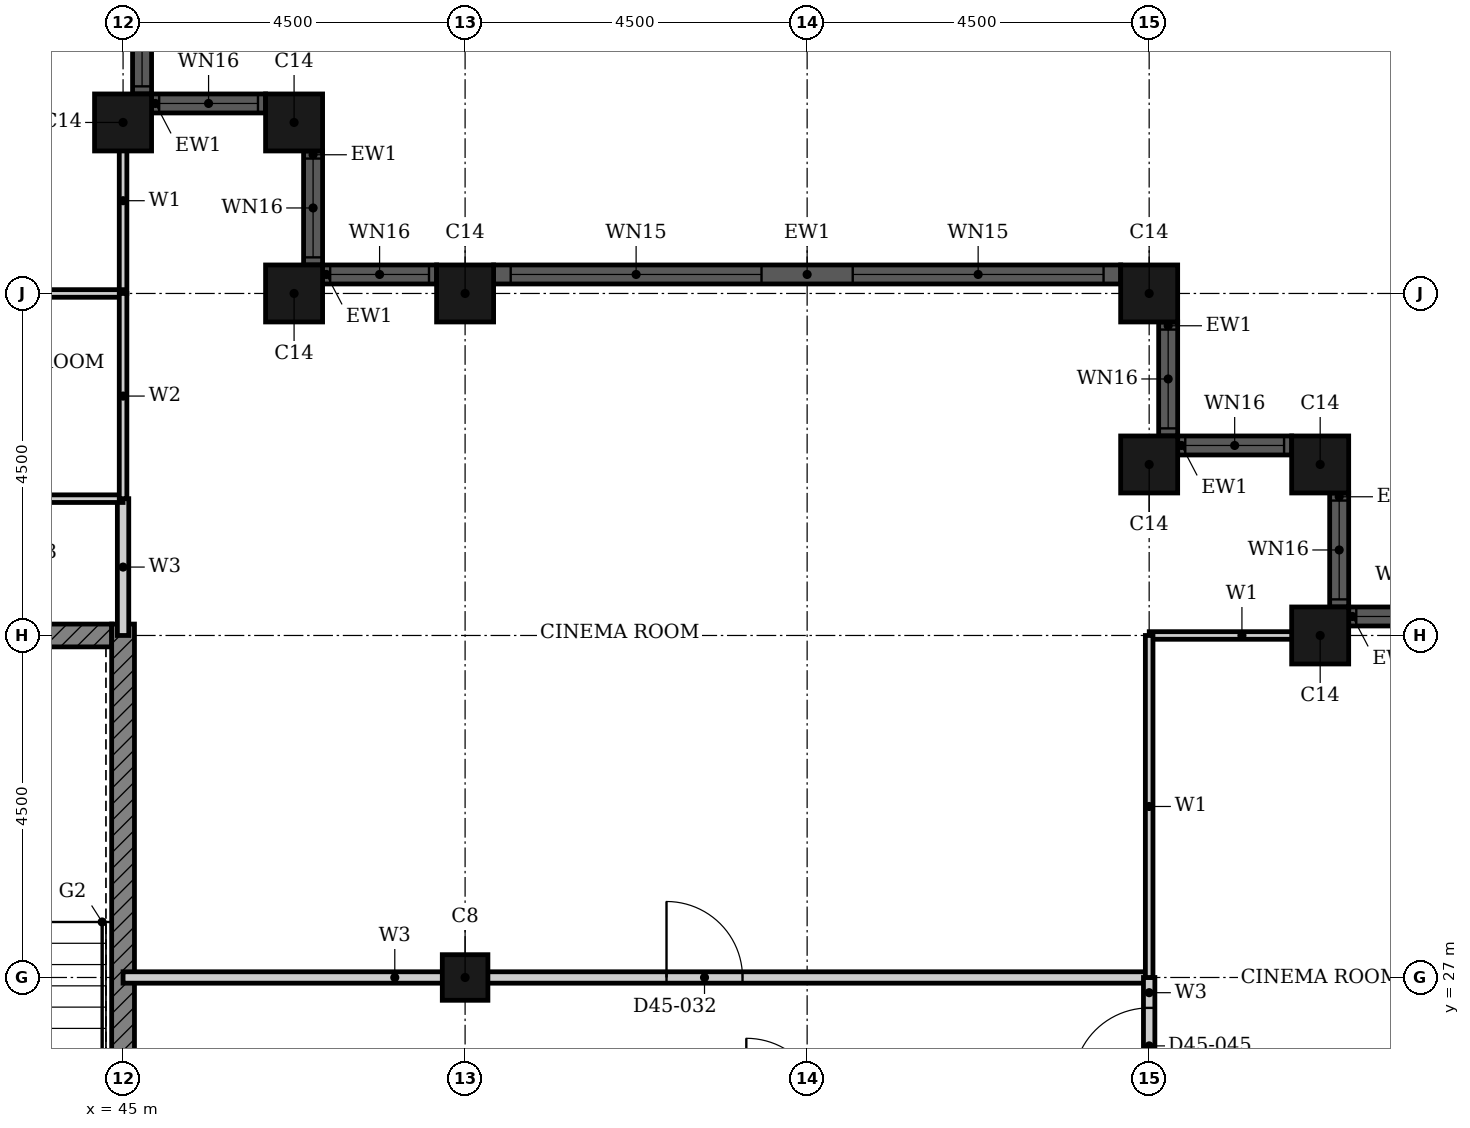
"""IFC4 building model, lengths in metres.
Left out: names, types, materials, properties, quantities, classifications, styles, units other than length and angle.
Written with IfcOpenShell. Run it as: python <this file> out.ifc"""

import sys

from ifc_helpers import new_model, si_unit, direction, frame, frame_2d, origin, origin_2d, place, context, subcontext, project, spatial, rectangle, hollow_rectangle, extrude, element, fill, save


model = new_model("IFC4")
c1 = context("Model", 3, precision=1e-05, world=origin(), true_north=direction((0.0, 1.0)))
c2 = subcontext(c1, "Body", "Model", "MODEL_VIEW")
j1 = project(units=[si_unit("LENGTHUNIT", "METRE"), si_unit("PLANEANGLEUNIT", "RADIAN")], contexts=[c1])
p1 = place(None, origin())
s1 = spatial("IfcSite", under=j1, at=p1, CompositionType="ELEMENT")
p2 = place(p1, origin())
s2 = spatial("IfcBuilding", under=s1, at=p2, CompositionType="ELEMENT")
p3 = place(p2, frame((0.0, 0.0, 180.2)))
s3 = spatial("IfcBuildingStorey", under=s2, at=p3, CompositionType="ELEMENT", Elevation=180.2)
for number, where, z_axis, x_axis in (
    (1, (60.75, 31.5, 0.0), (0.0, 0.0, 1.0), (1.0, 0.0, 0.0)),
    (2, (60.75, 33.75, 0.0), (0.0, 0.0, 1.0), (1.0, 0.0, 0.0)),
    (3, (58.5, 33.75, 0.0), (0.0, 0.0, 1.0), (1.0, 0.0, 0.0)),
    (4, (58.5, 36.0, 0.0), (0.0, 0.0, 1.0), (1.0, 0.0, 0.0)),
    (5, (49.5, 36.0, 0.0), (0.0, 0.0, 1.0), (1.0, 0.0, 0.0)),
    (6, (47.25, 36.0, 0.0), (0.0, 0.0, 1.0), (1.0, 0.0, 0.0)),
    (7, (47.25, 38.25, 0.0), (0.0, 0.0, 1.0), (1.0, 0.0, 0.0)),
    (8, (45.0, 38.25, 0.0), (0.0, 0.0, 1.0), (1.0, 0.0, 0.0)),
):
    element("IfcColumn", number, at=place(p3, frame(where, z_axis=z_axis, x_axis=x_axis)), inside=s3, PredefinedType="COLUMN", context=c2, shape_type="SweptSolid", body=[
        extrude(hollow_rectangle(XDim=0.75, YDim=0.75, WallThickness=0.024, at=origin_2d()), origin(), (0.0, 0.0, 1.0), 3.7),
    ])
p4 = place(p3, frame((49.5, 27.0, 0.0), z_axis=(0.0, 0.0, 1.0), x_axis=(1.0, 0.0, 0.0)))
e9 = element("IfcColumn", 9, at=p4, inside=s3, PredefinedType="COLUMN", context=c2, shape_type="SweptSolid", body=[
    extrude(hollow_rectangle(XDim=0.6, YDim=0.6, WallThickness=0.02, at=origin_2d()), origin(), (0.0, 0.0, 1.0), 3.7),
])
p5 = place(p3, frame((62.625, 31.75, 0.0), z_axis=(0.0, 0.0, 1.0), x_axis=(-1.0, 0.0, 0.0)))
e10 = element("IfcWall", 10, at=p5, inside=s3, PredefinedType="SOLIDWALL", context=c2, shape_type="SweptSolid", body=[
    extrude(rectangle(XDim=1.5, YDim=0.25, at=frame_2d((0.75, 0.0))), origin(), (0.0, 0.0, 1.0), 3.7),
])
p6 = place(p5, frame((0.1, 0.0, 0.9)))
e11 = element("IfcOpeningElement", 11, at=p6, cuts=e10, PredefinedType="OPENING", context=c2, shape_type="SweptSolid", body=[
    extrude(rectangle(XDim=1.3, YDim=1.85, at=frame_2d((0.65, 0.925))), frame((0.0, 0.135, 0.0), z_axis=(0.0, -1.0, 0.0), x_axis=(1.0, 0.0, 0.0)), (0.0, 0.0, 1.0), 0.27),
])
p7 = place(p3, frame((61.0, 31.875, 0.0), z_axis=(0.0, 0.0, 1.0), x_axis=(0.0, 1.0, 0.0)))
e12 = element("IfcWall", 12, at=p7, inside=s3, PredefinedType="SOLIDWALL", context=c2, shape_type="SweptSolid", body=[
    extrude(rectangle(XDim=1.5, YDim=0.25, at=frame_2d((0.75, 0.0))), origin(), (0.0, 0.0, 1.0), 3.7),
])
p8 = place(p7, frame((0.1, 0.0, 0.9)))
e13 = element("IfcOpeningElement", 13, at=p8, cuts=e12, PredefinedType="OPENING", context=c2, shape_type="SweptSolid", body=[
    extrude(rectangle(XDim=1.3, YDim=1.85, at=frame_2d((0.65, 0.925))), frame((0.0, 0.135, 0.0), z_axis=(0.0, -1.0, 0.0), x_axis=(1.0, 0.0, 0.0)), (0.0, 0.0, 1.0), 0.27),
])
p9 = place(p3, frame((60.375, 34.0, 0.0), z_axis=(0.0, 0.0, 1.0), x_axis=(-1.0, 0.0, 0.0)))
e14 = element("IfcWall", 14, at=p9, inside=s3, PredefinedType="SOLIDWALL", context=c2, shape_type="SweptSolid", body=[
    extrude(rectangle(XDim=1.5, YDim=0.25, at=frame_2d((0.75, 0.0))), origin(), (0.0, 0.0, 1.0), 3.7),
])
p10 = place(p9, frame((0.1, 0.0, 0.9)))
e15 = element("IfcOpeningElement", 15, at=p10, cuts=e14, PredefinedType="OPENING", context=c2, shape_type="SweptSolid", body=[
    extrude(rectangle(XDim=1.3, YDim=1.85, at=frame_2d((0.65, 0.925))), frame((0.0, 0.135, 0.0), z_axis=(0.0, -1.0, 0.0), x_axis=(1.0, 0.0, 0.0)), (0.0, 0.0, 1.0), 0.27),
])
p11 = place(p3, frame((58.75, 34.125, 0.0), z_axis=(0.0, 0.0, 1.0), x_axis=(0.0, 1.0, 0.0)))
e16 = element("IfcWall", 16, at=p11, inside=s3, PredefinedType="SOLIDWALL", context=c2, shape_type="SweptSolid", body=[
    extrude(rectangle(XDim=1.5, YDim=0.25, at=frame_2d((0.75, 0.0))), origin(), (0.0, 0.0, 1.0), 3.7),
])
p12 = place(p11, frame((0.1, 0.0, 0.9)))
e17 = element("IfcOpeningElement", 17, at=p12, cuts=e16, PredefinedType="OPENING", context=c2, shape_type="SweptSolid", body=[
    extrude(rectangle(XDim=1.3, YDim=1.85, at=frame_2d((0.65, 0.925))), frame((0.0, 0.135, 0.0), z_axis=(0.0, -1.0, 0.0), x_axis=(1.0, 0.0, 0.0)), (0.0, 0.0, 1.0), 0.27),
])
p13 = place(p3, frame((58.125, 36.25, 0.0), z_axis=(0.0, 0.0, 1.0), x_axis=(-1.0, 0.0, 0.0)))
e18 = element("IfcWall", 18, at=p13, inside=s3, PredefinedType="SOLIDWALL", context=c2, shape_type="SweptSolid", body=[
    extrude(rectangle(XDim=8.25, YDim=0.25, at=frame_2d((4.125, 0.0))), origin(), (0.0, 0.0, 1.0), 3.7),
])
p14 = place(p13, frame((0.225, 0.0, 0.45)))
e19 = element("IfcOpeningElement", 19, at=p14, cuts=e18, PredefinedType="OPENING", context=c2, shape_type="SweptSolid", body=[
    extrude(rectangle(XDim=3.3, YDim=2.3, at=frame_2d((1.65, 1.15))), frame((0.0, 0.135, 0.0), z_axis=(0.0, -1.0, 0.0), x_axis=(1.0, 0.0, 0.0)), (0.0, 0.0, 1.0), 0.27),
])
p15 = place(p13, frame((4.725, 0.0, 0.45)))
e20 = element("IfcOpeningElement", 20, at=p15, cuts=e18, PredefinedType="OPENING", context=c2, shape_type="SweptSolid", body=[
    extrude(rectangle(XDim=3.3, YDim=2.3, at=frame_2d((1.65, 1.15))), frame((0.0, 0.135, 0.0), z_axis=(0.0, -1.0, 0.0), x_axis=(1.0, 0.0, 0.0)), (0.0, 0.0, 1.0), 0.27),
])
p16 = place(p3, frame((49.125, 36.25, 0.0), z_axis=(0.0, 0.0, 1.0), x_axis=(-1.0, 0.0, 0.0)))
e21 = element("IfcWall", 21, at=p16, inside=s3, PredefinedType="SOLIDWALL", context=c2, shape_type="SweptSolid", body=[
    extrude(rectangle(XDim=1.5, YDim=0.25, at=frame_2d((0.75, 0.0))), origin(), (0.0, 0.0, 1.0), 3.7),
])
p17 = place(p16, frame((0.1, 0.0, 0.9)))
e22 = element("IfcOpeningElement", 22, at=p17, cuts=e21, PredefinedType="OPENING", context=c2, shape_type="SweptSolid", body=[
    extrude(rectangle(XDim=1.3, YDim=1.85, at=frame_2d((0.65, 0.925))), frame((0.0, 0.135, 0.0), z_axis=(0.0, -1.0, 0.0), x_axis=(1.0, 0.0, 0.0)), (0.0, 0.0, 1.0), 0.27),
])
p18 = place(p3, frame((47.5, 36.375, 0.0), z_axis=(0.0, 0.0, 1.0), x_axis=(0.0, 1.0, 0.0)))
e23 = element("IfcWall", 23, at=p18, inside=s3, PredefinedType="SOLIDWALL", context=c2, shape_type="SweptSolid", body=[
    extrude(rectangle(XDim=1.5, YDim=0.25, at=frame_2d((0.75, 0.0))), origin(), (0.0, 0.0, 1.0), 3.7),
])
p19 = place(p18, frame((0.1, 0.0, 0.9)))
e24 = element("IfcOpeningElement", 24, at=p19, cuts=e23, PredefinedType="OPENING", context=c2, shape_type="SweptSolid", body=[
    extrude(rectangle(XDim=1.3, YDim=1.85, at=frame_2d((0.65, 0.925))), frame((0.0, 0.135, 0.0), z_axis=(0.0, -1.0, 0.0), x_axis=(1.0, 0.0, 0.0)), (0.0, 0.0, 1.0), 0.27),
])
p20 = place(p3, frame((46.875, 38.5, 0.0), z_axis=(0.0, 0.0, 1.0), x_axis=(-1.0, 0.0, 0.0)))
e25 = element("IfcWall", 25, at=p20, inside=s3, PredefinedType="SOLIDWALL", context=c2, shape_type="SweptSolid", body=[
    extrude(rectangle(XDim=1.5, YDim=0.25, at=frame_2d((0.75, 0.0))), origin(), (0.0, 0.0, 1.0), 3.7),
])
p21 = place(p20, frame((0.1, 0.0, 0.9)))
e26 = element("IfcOpeningElement", 26, at=p21, cuts=e25, PredefinedType="OPENING", context=c2, shape_type="SweptSolid", body=[
    extrude(rectangle(XDim=1.3, YDim=1.85, at=frame_2d((0.65, 0.925))), frame((0.0, 0.135, 0.0), z_axis=(0.0, -1.0, 0.0), x_axis=(1.0, 0.0, 0.0)), (0.0, 0.0, 1.0), 0.27),
])
p22 = place(p3, frame((45.25, 38.625, 0.0), z_axis=(0.0, 0.0, 1.0), x_axis=(0.0, 1.0, 0.0)))
e27 = element("IfcWall", 27, at=p22, inside=s3, PredefinedType="SOLIDWALL", context=c2, shape_type="SweptSolid", body=[
    extrude(rectangle(XDim=1.5, YDim=0.25, at=frame_2d((0.75, 0.0))), origin(), (0.0, 0.0, 1.0), 3.7),
])
p23 = place(p22, frame((0.1, 0.0, 0.9)))
e28 = element("IfcOpeningElement", 28, at=p23, cuts=e27, PredefinedType="OPENING", context=c2, shape_type="SweptSolid", body=[
    extrude(rectangle(XDim=1.3, YDim=1.85, at=frame_2d((0.65, 0.925))), frame((0.0, 0.135, 0.0), z_axis=(0.0, -1.0, 0.0), x_axis=(1.0, 0.0, 0.0)), (0.0, 0.0, 1.0), 0.27),
])
p24 = place(p3, frame((40.625, 31.5, 0.0), z_axis=(0.0, 0.0, 1.0), x_axis=(1.0, 0.0, 0.0)))
e29 = element("IfcWall", 29, at=p24, inside=s3, PredefinedType="SHEAR", context=c2, shape_type="SweptSolid", body=[
    extrude(rectangle(XDim=4.225, YDim=0.3, at=frame_2d((2.113, 0.0))), origin(), (0.0, 0.0, 1.0), 3.4),
])
p25 = place(p3, frame((45.0, 22.35, 0.0), z_axis=(0.0, 0.0, 1.0), x_axis=(0.0, 1.0, 0.0)))
e30 = element("IfcWall", 30, at=p25, inside=s3, PredefinedType="SHEAR", context=c2, shape_type="SweptSolid", body=[
    extrude(rectangle(XDim=9.3, YDim=0.3, at=frame_2d((4.65, 0.0))), origin(), (0.0, 0.0, 1.0), 3.4),
])
p26 = place(p3, frame((45.0, 27.0, 0.0), z_axis=(0.0, 0.0, 1.0), x_axis=(1.0, 0.0, 0.0)))
e31 = element("IfcWall", 31, at=p26, inside=s3, PredefinedType="PARTITIONING", context=c2, shape_type="SweptSolid", body=[
    extrude(rectangle(XDim=13.5, YDim=0.15, at=frame_2d((6.75, 0.0))), origin(), (0.0, 0.0, 1.0), 2.68),
])
p27 = place(p26, frame((7.15, 0.0, 0.0)))
e32 = element("IfcOpeningElement", 32, at=p27, cuts=e31, PredefinedType="OPENING", context=c2, shape_type="SweptSolid", body=[
    extrude(rectangle(XDim=1.0, YDim=2.1, at=frame_2d((0.5, 1.05))), frame((0.0, 0.085, 0.0), z_axis=(0.0, -1.0, 0.0), x_axis=(1.0, 0.0, 0.0)), (0.0, 0.0, 1.0), 0.17),
])
p28 = place(p3, frame((45.0, 31.5, 0.0), z_axis=(0.0, 0.0, 1.0), x_axis=(0.0, 1.0, 0.0)))
e33 = element("IfcWall", 33, at=p28, inside=s3, PredefinedType="PARTITIONING", context=c2, shape_type="SweptSolid", body=[
    extrude(rectangle(XDim=1.8, YDim=0.15, at=frame_2d((0.9, 0.0))), origin(), (0.0, 0.0, 1.0), 3.4),
])
p29 = place(p3, frame((58.5, 25.2, 0.0), z_axis=(0.0, 0.0, 1.0), x_axis=(0.0, 1.0, 0.0)))
e34 = element("IfcWall", 34, at=p29, inside=s3, PredefinedType="PARTITIONING", context=c2, shape_type="SweptSolid", body=[
    extrude(rectangle(XDim=1.8, YDim=0.15, at=frame_2d((0.9, 0.0))), origin(), (0.0, 0.0, 1.0), 3.4),
])
p30 = place(p29, frame((0.4, 0.0, 0.0)))
e35 = element("IfcOpeningElement", 35, at=p30, cuts=e34, PredefinedType="OPENING", context=c2, shape_type="SweptSolid", body=[
    extrude(rectangle(XDim=1.0, YDim=2.1, at=frame_2d((0.5, 1.05))), frame((0.0, 0.085, 0.0), z_axis=(0.0, -1.0, 0.0), x_axis=(1.0, 0.0, 0.0)), (0.0, 0.0, 1.0), 0.17),
])
p31 = place(p3, frame((58.501, 31.5, 0.0), z_axis=(0.0, 0.0, 1.0), x_axis=(1.0, 0.0, 0.0)))
e36 = element("IfcWall", 36, at=p31, inside=s3, PredefinedType="PARTITIONING", context=c2, shape_type="SweptSolid", body=[
    extrude(rectangle(XDim=2.439, YDim=0.1, at=frame_2d((1.219, 0.0))), origin(), (0.0, 0.0, 1.0), 2.68),
])
p32 = place(p3, frame((45.0, 36.001, 0.0), z_axis=(0.0, 0.0, 1.0), x_axis=(0.0, 1.0, 0.0)))
e37 = element("IfcWall", 37, at=p32, inside=s3, PredefinedType="PARTITIONING", context=c2, shape_type="SweptSolid", body=[
    extrude(rectangle(XDim=2.439, YDim=0.1, at=frame_2d((1.219, 0.0))), origin(), (0.0, 0.0, 1.0), 3.4),
])
p33 = place(p3, frame((58.5, 27.0, 0.0), z_axis=(0.0, 0.0, 1.0), x_axis=(0.0, 1.0, 0.0)))
e38 = element("IfcWall", 38, at=p33, inside=s3, PredefinedType="PARTITIONING", context=c2, shape_type="SweptSolid", body=[
    extrude(rectangle(XDim=4.5, YDim=0.1, at=frame_2d((2.25, 0.0))), origin(), (0.0, 0.0, 1.0), 3.4),
])
for number, where, z_axis, x_axis in (
    (39, (42.6, 33.3, 0.0), (0.0, 0.0, 1.0), (1.0, 0.0, 0.0)),
    (40, (42.6, 36.0, 0.0), (0.0, 0.0, 1.0), (1.0, 0.0, 0.0)),
):
    element("IfcWall", number, at=place(p3, frame(where, z_axis=z_axis, x_axis=x_axis)), inside=s3, PredefinedType="PARTITIONING", context=c2, shape_type="SweptSolid", body=[
        extrude(rectangle(XDim=2.4, YDim=0.1, at=frame_2d((1.2, 0.0))), origin(), (0.0, 0.0, 1.0), 3.4),
    ])
p34 = place(p3, frame((45.0, 33.3, 0.0), z_axis=(0.0, 0.0, 1.0), x_axis=(0.0, 1.0, 0.0)))
e41 = element("IfcWall", 41, at=p34, inside=s3, PredefinedType="PARTITIONING", context=c2, shape_type="SweptSolid", body=[
    extrude(rectangle(XDim=2.7, YDim=0.1, at=frame_2d((1.35, 0.0))), origin(), (0.0, 0.0, 1.0), 3.4),
])
p35 = place(p6, origin())
e42 = element("IfcWindow", 42, at=p35, inside=s3, PartitioningType="SINGLE_PANEL", PredefinedType="WINDOW", context=c2, shape_type="SweptSolid", body=[
    extrude(rectangle(XDim=1.3, YDim=1.85, at=frame_2d((0.65, 0.925))), frame((0.0, 0.03, 0.0), z_axis=(0.0, -1.0, 0.0), x_axis=(1.0, 0.0, 0.0)), (0.0, 0.0, 1.0), 0.06),
])
fill(e11, e42)
p36 = place(p8, origin())
e43 = element("IfcWindow", 43, at=p36, inside=s3, PartitioningType="SINGLE_PANEL", PredefinedType="WINDOW", context=c2, shape_type="SweptSolid", body=[
    extrude(rectangle(XDim=1.3, YDim=1.85, at=frame_2d((0.65, 0.925))), frame((0.0, 0.03, 0.0), z_axis=(0.0, -1.0, 0.0), x_axis=(1.0, 0.0, 0.0)), (0.0, 0.0, 1.0), 0.06),
])
fill(e13, e43)
p37 = place(p10, origin())
e44 = element("IfcWindow", 44, at=p37, inside=s3, PartitioningType="SINGLE_PANEL", PredefinedType="WINDOW", context=c2, shape_type="SweptSolid", body=[
    extrude(rectangle(XDim=1.3, YDim=1.85, at=frame_2d((0.65, 0.925))), frame((0.0, 0.03, 0.0), z_axis=(0.0, -1.0, 0.0), x_axis=(1.0, 0.0, 0.0)), (0.0, 0.0, 1.0), 0.06),
])
fill(e15, e44)
p38 = place(p12, origin())
e45 = element("IfcWindow", 45, at=p38, inside=s3, PartitioningType="SINGLE_PANEL", PredefinedType="WINDOW", context=c2, shape_type="SweptSolid", body=[
    extrude(rectangle(XDim=1.3, YDim=1.85, at=frame_2d((0.65, 0.925))), frame((0.0, 0.03, 0.0), z_axis=(0.0, -1.0, 0.0), x_axis=(1.0, 0.0, 0.0)), (0.0, 0.0, 1.0), 0.06),
])
fill(e17, e45)
p39 = place(p14, origin())
e46 = element("IfcWindow", 46, at=p39, inside=s3, PartitioningType="SINGLE_PANEL", PredefinedType="WINDOW", context=c2, shape_type="SweptSolid", body=[
    extrude(rectangle(XDim=3.3, YDim=2.3, at=frame_2d((1.65, 1.15))), frame((0.0, 0.03, 0.0), z_axis=(0.0, -1.0, 0.0), x_axis=(1.0, 0.0, 0.0)), (0.0, 0.0, 1.0), 0.06),
])
fill(e19, e46)
p40 = place(p15, origin())
e47 = element("IfcWindow", 47, at=p40, inside=s3, PartitioningType="SINGLE_PANEL", PredefinedType="WINDOW", context=c2, shape_type="SweptSolid", body=[
    extrude(rectangle(XDim=3.3, YDim=2.3, at=frame_2d((1.65, 1.15))), frame((0.0, 0.03, 0.0), z_axis=(0.0, -1.0, 0.0), x_axis=(1.0, 0.0, 0.0)), (0.0, 0.0, 1.0), 0.06),
])
fill(e20, e47)
p41 = place(p17, origin())
e48 = element("IfcWindow", 48, at=p41, inside=s3, PartitioningType="SINGLE_PANEL", PredefinedType="WINDOW", context=c2, shape_type="SweptSolid", body=[
    extrude(rectangle(XDim=1.3, YDim=1.85, at=frame_2d((0.65, 0.925))), frame((0.0, 0.03, 0.0), z_axis=(0.0, -1.0, 0.0), x_axis=(1.0, 0.0, 0.0)), (0.0, 0.0, 1.0), 0.06),
])
fill(e22, e48)
p42 = place(p19, origin())
e49 = element("IfcWindow", 49, at=p42, inside=s3, PartitioningType="SINGLE_PANEL", PredefinedType="WINDOW", context=c2, shape_type="SweptSolid", body=[
    extrude(rectangle(XDim=1.3, YDim=1.85, at=frame_2d((0.65, 0.925))), frame((0.0, 0.03, 0.0), z_axis=(0.0, -1.0, 0.0), x_axis=(1.0, 0.0, 0.0)), (0.0, 0.0, 1.0), 0.06),
])
fill(e24, e49)
p43 = place(p21, origin())
e50 = element("IfcWindow", 50, at=p43, inside=s3, PartitioningType="SINGLE_PANEL", PredefinedType="WINDOW", context=c2, shape_type="SweptSolid", body=[
    extrude(rectangle(XDim=1.3, YDim=1.85, at=frame_2d((0.65, 0.925))), frame((0.0, 0.03, 0.0), z_axis=(0.0, -1.0, 0.0), x_axis=(1.0, 0.0, 0.0)), (0.0, 0.0, 1.0), 0.06),
])
fill(e26, e50)
p44 = place(p23, origin())
e51 = element("IfcWindow", 51, at=p44, inside=s3, PartitioningType="SINGLE_PANEL", PredefinedType="WINDOW", context=c2, shape_type="SweptSolid", body=[
    extrude(rectangle(XDim=1.3, YDim=1.85, at=frame_2d((0.65, 0.925))), frame((0.0, 0.03, 0.0), z_axis=(0.0, -1.0, 0.0), x_axis=(1.0, 0.0, 0.0)), (0.0, 0.0, 1.0), 0.06),
])
fill(e28, e51)
p45 = place(p27, origin())
e52 = element("IfcDoor", 52, at=p45, inside=s3, OperationType="SINGLE_SWING_RIGHT", PredefinedType="DOOR", context=c2, shape_type="SweptSolid", body=[
    extrude(rectangle(XDim=1.0, YDim=2.1, at=frame_2d((0.5, 1.05))), frame((0.0, 0.025, 0.0), z_axis=(0.0, -1.0, 0.0), x_axis=(1.0, 0.0, 0.0)), (0.0, 0.0, 1.0), 0.05),
])
fill(e32, e52)
p46 = place(p30, origin())
e53 = element("IfcDoor", 53, at=p46, inside=s3, OperationType="SINGLE_SWING_RIGHT", PredefinedType="DOOR", context=c2, shape_type="SweptSolid", body=[
    extrude(rectangle(XDim=1.0, YDim=2.1, at=frame_2d((0.5, 1.05))), frame((0.0, 0.025, 0.0), z_axis=(0.0, -1.0, 0.0), x_axis=(1.0, 0.0, 0.0)), (0.0, 0.0, 1.0), 0.05),
])
fill(e35, e53)
save(model, sys.argv[1])
